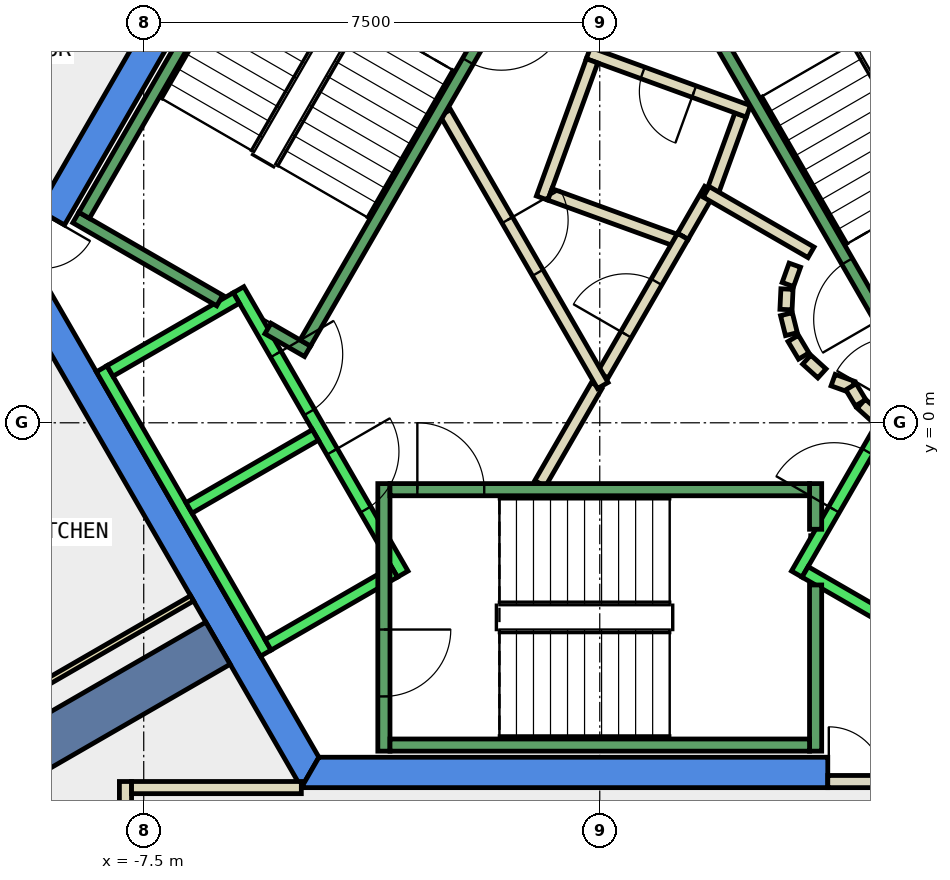
"""IFC4 building model, lengths in metres.
Left out: names, types, materials, properties, quantities, classifications, styles, units other than length and angle.
Written with IfcOpenShell. Run it as: python <this file> out.ifc"""

import sys

from ifc_helpers import new_model, si_unit, direction, frame, frame_2d, origin, place, context, subcontext, project, spatial, polyline, rectangle, outline, extrude, element, fill, save


model = new_model("IFC4")
c1 = context("Model", 3, precision=1e-05, world=origin(), true_north=direction((0.0, 1.0)))
c2 = subcontext(c1, "Body", "Model", "MODEL_VIEW")
j1 = project(units=[si_unit("LENGTHUNIT", "METRE"), si_unit("PLANEANGLEUNIT", "RADIAN")], contexts=[c1])
p1 = place(None, origin())
s1 = spatial("IfcSite", under=j1, at=p1, CompositionType="ELEMENT")
p2 = place(p1, origin())
s2 = spatial("IfcBuilding", under=s1, at=p2, CompositionType="ELEMENT")
p3 = place(p2, frame((0.0, 0.0, 322.4)))
s3 = spatial("IfcBuildingStorey", under=s2, at=p3, CompositionType="ELEMENT", Elevation=322.4)
p4 = place(p3, frame((0.0, 0.0, -0.34)))
e1 = element("IfcWall", 1, at=p4, inside=s3, PredefinedType="SHEAR", context=c2, shape_type="SweptSolid", body=[
    extrude(outline(polyline([(-9.236, 3.502), (-8.803, 3.253), (-4.619, 10.5), (-4.907, 11.0), (-9.236, 3.502)])), origin(), (0.0, 0.0, 1.0), 3.34),
])
p5 = place(p3, frame((0.0, 0.0, -0.34)))
e2 = element("IfcWall", 2, at=p5, inside=s3, PredefinedType="SHEAR", context=c2, shape_type="SweptSolid", body=[
    extrude(outline(polyline([(-9.815, 2.5), (-4.907, -6.0), (-4.619, -5.5), (-9.238, 2.5), (-9.815, 2.5)])), origin(), (0.0, 0.0, 1.0), 3.34),
])
p6 = place(p3, frame((0.0, 0.0, -0.34)))
e3 = element("IfcWall", 3, at=p6, inside=s3, PredefinedType="SHEAR", context=c2, shape_type="SweptSolid", body=[
    extrude(outline(polyline([(3.75, -6.0), (3.75, -5.5), (-4.619, -5.5), (-4.907, -6.0), (3.75, -6.0)])), origin(), (0.0, 0.0, 1.0), 3.34),
])
p7 = place(p3, frame((-6.279, -3.625, -0.34), z_axis=(0.0, 0.0, 1.0), x_axis=(-0.866017533419, -0.500013631625, 0.0)))
e4 = element("IfcWall", 4, at=p7, inside=s3, PredefinedType="SHEAR", context=c2, shape_type="SweptSolid", body=[
    extrude(rectangle(XDim=9.0, YDim=0.8, at=frame_2d((4.5, 0.0))), origin(), (0.0, 0.0, 1.0), 3.34),
])
p8 = place(p3, frame((1.366, 3.066, 0.0), z_axis=(0.0, 0.0, 1.0), x_axis=(0.499698775601, 0.866199245938, 0.0)))
e5 = element("IfcWall", 5, at=p8, inside=s3, PredefinedType="PARTITIONING", context=c2, shape_type="SweptSolid", body=[
    extrude(rectangle(XDim=0.893, YDim=0.2, at=frame_2d((0.446, 0.0))), origin(), (0.0, 0.0, 1.0), 3.0),
])
p9 = place(p3, frame((1.838, 3.748, 0.0), z_axis=(0.0, 0.0, 1.0), x_axis=(0.341883255813, 0.939742432475, 0.0)))
e6 = element("IfcWall", 6, at=p9, inside=s3, PredefinedType="PARTITIONING", context=c2, shape_type="SweptSolid", body=[
    extrude(rectangle(XDim=1.398, YDim=0.2, at=frame_2d((0.699, 0.0))), origin(), (0.0, 0.0, 1.0), 3.0),
])
p10 = place(p3, frame((2.444, 5.122, 0.0), z_axis=(0.0, 0.0, 1.0), x_axis=(-0.939650782256, 0.342135071873, 0.0)))
e7 = element("IfcWall", 7, at=p10, inside=s3, PredefinedType="PARTITIONING", context=c2, shape_type="SweptSolid", body=[
    extrude(rectangle(XDim=2.8, YDim=0.2, at=frame_2d((1.4, 0.0))), origin(), (0.0, 0.0, 1.0), 3.0),
])
p11 = place(p10, frame((0.95, 0.0, 0.0)))
e8 = element("IfcOpeningElement", 8, at=p11, cuts=e7, PredefinedType="OPENING", context=c2, shape_type="SweptSolid", body=[
    extrude(rectangle(XDim=0.9, YDim=2.1, at=frame_2d((0.45, 1.05))), frame((0.0, 0.11, 0.0), z_axis=(0.0, -1.0, 0.0), x_axis=(1.0, 0.0, 0.0)), (0.0, 0.0, 1.0), 0.22),
])
p12 = place(p3, frame((-0.127, 5.952, 0.0), z_axis=(0.0, 0.0, 1.0), x_axis=(-0.342012513308, -0.93969539785, 0.0)))
e9 = element("IfcWall", 9, at=p12, inside=s3, PredefinedType="PARTITIONING", context=c2, shape_type="SweptSolid", body=[
    extrude(rectangle(XDim=2.401, YDim=0.2, at=frame_2d((1.2, 0.0))), origin(), (0.0, 0.0, 1.0), 3.0),
])
p13 = place(p3, frame((-0.82, 3.756, 0.0), z_axis=(0.0, 0.0, 1.0), x_axis=(0.939740098492, -0.34188967122, 0.0)))
e10 = element("IfcWall", 10, at=p13, inside=s3, PredefinedType="PARTITIONING", context=c2, shape_type="SweptSolid", body=[
    extrude(rectangle(XDim=2.273, YDim=0.2, at=frame_2d((1.136, 0.0))), origin(), (0.0, 0.0, 1.0), 3.0),
])
p14 = place(p3, frame((-0.982, -1.0, 0.0), z_axis=(0.0, 0.0, 1.0), x_axis=(0.50024047865, 0.865886518847, 0.0)))
e11 = element("IfcWall", 11, at=p14, inside=s3, PredefinedType="PARTITIONING", context=c2, shape_type="SweptSolid", body=[
    extrude(rectangle(XDim=1.863, YDim=0.2, at=frame_2d((0.931, 0.0))), origin(), (0.0, 0.0, 1.0), 3.0),
])
p15 = place(p3, frame((0.05, 0.787, 0.0), z_axis=(0.0, 0.0, 1.0), x_axis=(0.500070457302, 0.865984721421, 0.0)))
e12 = element("IfcWall", 12, at=p15, inside=s3, PredefinedType="PARTITIONING", context=c2, shape_type="SweptSolid", body=[
    extrude(rectangle(XDim=2.631, YDim=0.2, at=frame_2d((1.316, 0.0))), origin(), (0.0, 0.0, 1.0), 3.0),
])
p16 = place(p15, frame((0.766, 0.0, 0.0)))
e13 = element("IfcOpeningElement", 13, at=p16, cuts=e12, PredefinedType="OPENING", context=c2, shape_type="SweptSolid", body=[
    extrude(rectangle(XDim=1.0, YDim=2.1, at=frame_2d((0.5, 1.05))), frame((0.0, 0.11, 0.0), z_axis=(0.0, -1.0, 0.0), x_axis=(1.0, 0.0, 0.0)), (0.0, 0.0, 1.0), 0.22),
])
p17 = place(p3, frame((1.751, 3.798, 0.0), z_axis=(0.0, 0.0, 1.0), x_axis=(0.866091650241, -0.499885240213, 0.0)))
e14 = element("IfcWall", 14, at=p17, inside=s3, PredefinedType="PARTITIONING", context=c2, shape_type="SweptSolid", body=[
    extrude(rectangle(XDim=1.991, YDim=0.2, at=frame_2d((0.995, 0.0))), origin(), (0.0, 0.0, 1.0), 3.0),
])
p18 = place(p3, frame((3.208, 2.592, 0.0), z_axis=(0.0, 0.0, 1.0), x_axis=(-0.337388820924, -0.941365382578, 0.0)))
e15 = element("IfcWall", 15, at=p18, inside=s3, PredefinedType="PARTITIONING", context=c2, shape_type="SweptSolid", body=[
    extrude(rectangle(XDim=0.338, YDim=0.2, at=frame_2d((0.169, 0.0))), origin(), (0.0, 0.0, 1.0), 3.0),
])
p19 = place(p3, frame((3.079, 2.199, 0.0), z_axis=(0.0, 0.0, 1.0), x_axis=(-0.047771483479, -0.998858290933, 0.0)))
e16 = element("IfcWall", 16, at=p19, inside=s3, PredefinedType="PARTITIONING", context=c2, shape_type="SweptSolid", body=[
    extrude(rectangle(XDim=0.337, YDim=0.2, at=frame_2d((0.169, 0.0))), origin(), (0.0, 0.0, 1.0), 3.0),
])
p20 = place(p3, frame((3.07, 1.786, 0.0), z_axis=(0.0, 0.0, 1.0), x_axis=(0.242705583207, -0.970099994784, 0.0)))
e17 = element("IfcWall", 17, at=p20, inside=s3, PredefinedType="PARTITIONING", context=c2, shape_type="SweptSolid", body=[
    extrude(rectangle(XDim=0.338, YDim=0.2, at=frame_2d((0.169, 0.0))), origin(), (0.0, 0.0, 1.0), 3.0),
])
for number, where, z_axis, x_axis in (
    (18, (3.182, 1.388, 0.0), (0.0, 0.0, 1.0), (0.512, -0.859, 0.0)),
    (19, (3.404, 1.039, 0.0), (0.0, 0.0, 1.0), (0.74, -0.672, 0.0)),
):
    element("IfcWall", number, at=place(p3, frame(where, z_axis=z_axis, x_axis=x_axis)), inside=s3, PredefinedType="PARTITIONING", context=c2, shape_type="SweptSolid", body=[
        extrude(rectangle(XDim=0.338, YDim=0.2, at=frame_2d((0.169, 0.0))), origin(), (0.0, 0.0, 1.0), 3.0),
    ])
p21 = place(p3, frame((3.838, 0.702, 0.0), z_axis=(0.0, 0.0, 1.0), x_axis=(0.941035081519, -0.338308993895, 0.0)))
e20 = element("IfcWall", 20, at=p21, inside=s3, PredefinedType="PARTITIONING", context=c2, shape_type="SweptSolid", body=[
    extrude(rectangle(XDim=0.337, YDim=0.2, at=frame_2d((0.168, 0.0))), origin(), (0.0, 0.0, 1.0), 3.0),
])
p22 = place(p3, frame((4.132, 0.593, 0.0), z_axis=(0.0, 0.0, 1.0), x_axis=(0.513561617048, -0.858052717201, 0.0)))
e21 = element("IfcWall", 21, at=p22, inside=s3, PredefinedType="PARTITIONING", context=c2, shape_type="SweptSolid", body=[
    extrude(rectangle(XDim=0.308, YDim=0.2, at=frame_2d((0.154, 0.0))), origin(), (0.0, 0.0, 1.0), 3.0),
])
p23 = place(p3, frame((4.301, 0.315, 0.0), z_axis=(0.0, 0.0, 1.0), x_axis=(0.741798017506, -0.670623367639, 0.0)))
e22 = element("IfcWall", 22, at=p23, inside=s3, PredefinedType="PARTITIONING", context=c2, shape_type="SweptSolid", body=[
    extrude(rectangle(XDim=0.309, YDim=0.2, at=frame_2d((0.154, 0.0))), origin(), (0.0, 0.0, 1.0), 3.0),
])
p24 = place(p3, frame((-2.54, 5.1, 0.0), z_axis=(0.0, 0.0, 1.0), x_axis=(0.499925051871, -0.866068670783, 0.0)))
e23 = element("IfcWall", 23, at=p24, inside=s3, PredefinedType="PARTITIONING", context=c2, shape_type="SweptSolid", body=[
    extrude(rectangle(XDim=5.181, YDim=0.2, at=frame_2d((2.59, 0.0))), origin(), (0.0, 0.0, 1.0), 3.0),
])
p25 = place(p24, frame((2.04, 0.0, 0.0)))
e24 = element("IfcOpeningElement", 24, at=p25, cuts=e23, PredefinedType="OPENING", context=c2, shape_type="SweptSolid", body=[
    extrude(rectangle(XDim=1.0, YDim=2.1, at=frame_2d((0.5, 1.05))), frame((0.0, 0.11, 0.0), z_axis=(0.0, -1.0, 0.0), x_axis=(1.0, 0.0, 0.0)), (0.0, 0.0, 1.0), 0.22),
])
p26 = place(p3, frame((-7.8, -11.624, 0.0), z_axis=(0.0, 0.0, 1.0), x_axis=(0.0, 1.0, 0.0)))
e25 = element("IfcWall", 25, at=p26, inside=s3, PredefinedType="PARTITIONING", context=c2, shape_type="SweptSolid", body=[
    extrude(rectangle(XDim=5.725, YDim=0.2, at=frame_2d((2.863, 0.0))), origin(), (0.0, 0.0, 1.0), 3.0),
])
p27 = place(p3, frame((-7.7, -5.999, 0.0), z_axis=(0.0, 0.0, 1.0), x_axis=(1.0, 0.0, 0.0)))
e26 = element("IfcWall", 26, at=p27, inside=s3, PredefinedType="PARTITIONING", context=c2, shape_type="SweptSolid", body=[
    extrude(rectangle(XDim=2.792, YDim=0.2, at=frame_2d((1.396, 0.0))), origin(), (0.0, 0.0, 1.0), 3.0),
])
p28 = place(p3, frame((-6.705, -2.887, 0.0), z_axis=(0.0, 0.0, 1.0), x_axis=(-0.866001397039, -0.500041578597, 0.0)))
e27 = element("IfcWall", 27, at=p28, inside=s3, PredefinedType="PARTITIONING", context=c2, shape_type="SweptSolid", body=[
    extrude(rectangle(XDim=6.998, YDim=0.1, at=frame_2d((3.499, 0.0))), origin(), (0.0, 0.0, 1.0), 3.0),
])
p29 = place(p3, frame((3.75, -5.9, 0.0), z_axis=(0.0, 0.0, 1.0), x_axis=(1.0, 0.0, 0.0)))
e28 = element("IfcWall", 28, at=p29, inside=s3, PredefinedType="PARTITIONING", context=c2, shape_type="SweptSolid", body=[
    extrude(rectangle(XDim=0.926, YDim=0.2, at=frame_2d((0.463, 0.0))), origin(), (0.0, 0.0, 1.0), 2.4),
])
p30 = place(p29, frame((0.017, 0.0, 0.0)))
e29 = element("IfcOpeningElement", 29, at=p30, cuts=e28, PredefinedType="OPENING", context=c2, shape_type="SweptSolid", body=[
    extrude(rectangle(XDim=0.9, YDim=2.1, at=frame_2d((0.45, 1.05))), frame((0.0, 0.11, 0.0), z_axis=(0.0, -1.0, 0.0), x_axis=(1.0, 0.0, 0.0)), (0.0, 0.0, 1.0), 0.22),
])
p31 = place(p3, frame((-5.94, 2.188, 0.0), z_axis=(0.0, 0.0, 1.0), x_axis=(0.500034260056, -0.866005622828, 0.0)))
e30 = element("IfcWall", 30, at=p31, inside=s3, PredefinedType="STANDARD", context=c2, shape_type="SweptSolid", body=[
    extrude(rectangle(XDim=5.399, YDim=0.2, at=frame_2d((2.7, 0.0))), origin(), (0.0, 0.0, 1.0), 3.0),
])
p32 = place(p31, frame((3.075, 0.0, 0.0)))
e31 = element("IfcOpeningElement", 31, at=p32, cuts=e30, PredefinedType="OPENING", context=c2, shape_type="SweptSolid", body=[
    extrude(rectangle(XDim=1.1, YDim=2.1, at=frame_2d((0.55, 1.05))), frame((0.0, 0.11, 0.0), z_axis=(0.0, -1.0, 0.0), x_axis=(1.0, 0.0, 0.0)), (0.0, 0.0, 1.0), 0.22),
])
p33 = place(p31, frame((1.225, 0.0, 0.0)))
e32 = element("IfcOpeningElement", 32, at=p33, cuts=e30, PredefinedType="OPENING", context=c2, shape_type="SweptSolid", body=[
    extrude(rectangle(XDim=1.1, YDim=2.1, at=frame_2d((0.55, 1.05))), frame((0.0, 0.11, 0.0), z_axis=(0.0, -1.0, 0.0), x_axis=(1.0, 0.0, 0.0)), (0.0, 0.0, 1.0), 0.22),
])
p34 = place(p3, frame((-8.192, 0.888, 0.0), z_axis=(0.0, 0.0, 1.0), x_axis=(0.500034260056, -0.866005622828, 0.0)))
e33 = element("IfcWall", 33, at=p34, inside=s3, PredefinedType="STANDARD", context=c2, shape_type="SweptSolid", body=[
    extrude(rectangle(XDim=5.399, YDim=0.2, at=frame_2d((2.7, 0.0))), origin(), (0.0, 0.0, 1.0), 3.0),
])
for number, where, z_axis, x_axis in (
    (34, (-5.977, 2.052, 0.0), (0.0, 0.0, 1.0), (-0.866, -0.5, 0.0)),
    (35, (-4.677, -0.2, 0.0), (0.0, 0.0, 1.0), (-0.866, -0.5, 0.0)),
):
    element("IfcWall", number, at=place(p3, frame(where, z_axis=z_axis, x_axis=x_axis)), inside=s3, PredefinedType="STANDARD", context=c2, shape_type="SweptSolid", body=[
        extrude(rectangle(XDim=2.399, YDim=0.2, at=frame_2d((1.2, 0.0))), origin(), (0.0, 0.0, 1.0), 3.0),
    ])
p35 = place(p3, frame((-3.377, -2.452, 0.0), z_axis=(0.0, 0.0, 1.0), x_axis=(-0.865955154139, -0.50012165622, 0.0)))
e36 = element("IfcWall", 36, at=p35, inside=s3, PredefinedType="STANDARD", context=c2, shape_type="SweptSolid", body=[
    extrude(rectangle(XDim=2.4, YDim=0.2, at=frame_2d((1.2, 0.0))), origin(), (0.0, 0.0, 1.0), 3.0),
])
p36 = place(p3, frame((3.24, -2.488, 0.0), z_axis=(0.0, 0.0, 1.0), x_axis=(0.500034260056, 0.866005622828, 0.0)))
e37 = element("IfcWall", 37, at=p36, inside=s3, PredefinedType="STANDARD", context=c2, shape_type="SweptSolid", body=[
    extrude(rectangle(XDim=5.399, YDim=0.2, at=frame_2d((2.7, 0.0))), origin(), (0.0, 0.0, 1.0), 3.0),
])
p37 = place(p36, frame((3.225, 0.0, 0.0)))
e38 = element("IfcOpeningElement", 38, at=p37, cuts=e37, PredefinedType="OPENING", context=c2, shape_type="SweptSolid", body=[
    extrude(rectangle(XDim=1.1, YDim=2.1, at=frame_2d((0.55, 1.05))), frame((0.0, 0.11, 0.0), z_axis=(0.0, -1.0, 0.0), x_axis=(1.0, 0.0, 0.0)), (0.0, 0.0, 1.0), 0.22),
])
p38 = place(p36, frame((1.225, 0.0, 0.0)))
e39 = element("IfcOpeningElement", 39, at=p38, cuts=e37, PredefinedType="OPENING", context=c2, shape_type="SweptSolid", body=[
    extrude(rectangle(XDim=1.1, YDim=2.1, at=frame_2d((0.55, 1.05))), frame((0.0, 0.11, 0.0), z_axis=(0.0, -1.0, 0.0), x_axis=(1.0, 0.0, 0.0)), (0.0, 0.0, 1.0), 0.22),
])
p39 = place(p3, frame((3.377, -2.452, 0.0), z_axis=(0.0, 0.0, 1.0), x_axis=(0.865955154139, -0.50012165622, 0.0)))
e40 = element("IfcWall", 40, at=p39, inside=s3, PredefinedType="STANDARD", context=c2, shape_type="SweptSolid", body=[
    extrude(rectangle(XDim=2.4, YDim=0.2, at=frame_2d((1.2, 0.0))), origin(), (0.0, 0.0, 1.0), 3.0),
])
p40 = place(p3, frame((-3.55, -1.0, 0.0), z_axis=(0.0, 0.0, 1.0), x_axis=(0.0, -1.0, 0.0)))
e41 = element("IfcWall", 41, at=p40, inside=s3, PredefinedType="STANDARD", context=c2, shape_type="SweptSolid", body=[
    extrude(rectangle(XDim=4.4, YDim=0.2, at=frame_2d((2.2, 0.0))), origin(), (0.0, 0.0, 1.0), 3.0),
])
p41 = place(p40, frame((2.4, 0.0, 0.0)))
e42 = element("IfcOpeningElement", 42, at=p41, cuts=e41, PredefinedType="OPENING", context=c2, shape_type="SweptSolid", body=[
    extrude(rectangle(XDim=1.1, YDim=2.2, at=frame_2d((0.55, 1.1))), frame((0.0, 0.11, 0.0), z_axis=(0.0, -1.0, 0.0), x_axis=(1.0, 0.0, 0.0)), (0.0, 0.0, 1.0), 0.22),
])
p42 = place(p3, frame((3.55, -2.667, 0.0), z_axis=(0.0, 0.0, 1.0), x_axis=(0.0, -1.0, 0.0)))
e43 = element("IfcWall", 43, at=p42, inside=s3, PredefinedType="STANDARD", context=c2, shape_type="SweptSolid", body=[
    extrude(rectangle(XDim=2.733, YDim=0.2, at=frame_2d((1.366, 0.0))), origin(), (0.0, 0.0, 1.0), 3.0),
])
p43 = place(p3, frame((3.55, -1.0, 0.0), z_axis=(0.0, 0.0, 1.0), x_axis=(0.0, -1.0, 0.0)))
e44 = element("IfcWall", 44, at=p43, inside=s3, PredefinedType="STANDARD", context=c2, shape_type="SweptSolid", body=[
    extrude(rectangle(XDim=0.751, YDim=0.2, at=frame_2d((0.375, 0.0))), origin(), (0.0, 0.0, 1.0), 3.0),
])
p44 = place(p3, frame((-3.45, -1.1, 0.0), z_axis=(0.0, 0.0, 1.0), x_axis=(1.0, 0.0, 0.0)))
e45 = element("IfcWall", 45, at=p44, inside=s3, PredefinedType="STANDARD", context=c2, shape_type="SweptSolid", body=[
    extrude(rectangle(XDim=6.9, YDim=0.2, at=frame_2d((3.45, 0.0))), origin(), (0.0, 0.0, 1.0), 3.0),
])
p45 = place(p44, frame((0.45, 0.0, 0.0)))
e46 = element("IfcOpeningElement", 46, at=p45, cuts=e45, PredefinedType="OPENING", context=c2, shape_type="SweptSolid", body=[
    extrude(rectangle(XDim=1.1, YDim=2.2, at=frame_2d((0.55, 1.1))), frame((0.0, 0.11, 0.0), z_axis=(0.0, -1.0, 0.0), x_axis=(1.0, 0.0, 0.0)), (0.0, 0.0, 1.0), 0.22),
])
p46 = place(p3, frame((-3.45, -5.3, 0.0), z_axis=(0.0, 0.0, 1.0), x_axis=(1.0, 0.0, 0.0)))
e47 = element("IfcWall", 47, at=p46, inside=s3, PredefinedType="STANDARD", context=c2, shape_type="SweptSolid", body=[
    extrude(rectangle(XDim=6.9, YDim=0.2, at=frame_2d((3.45, 0.0))), origin(), (0.0, 0.0, 1.0), 3.0),
])
p47 = place(p3, frame((4.843, 1.312, 0.0), z_axis=(0.0, 0.0, 1.0), x_axis=(-0.499963383562, 0.866046543262, 0.0)))
e48 = element("IfcWall", 48, at=p47, inside=s3, PredefinedType="STANDARD", context=c2, shape_type="SweptSolid", body=[
    extrude(rectangle(XDim=6.9, YDim=0.2, at=frame_2d((3.45, 0.0))), origin(), (0.0, 0.0, 1.0), 3.0),
])
p48 = place(p47, frame((0.45, 0.0, 0.0)))
e49 = element("IfcOpeningElement", 49, at=p48, cuts=e48, PredefinedType="OPENING", context=c2, shape_type="SweptSolid", body=[
    extrude(rectangle(XDim=1.1, YDim=2.2, at=frame_2d((0.55, 1.1))), frame((0.0, 0.11, 0.0), z_axis=(0.0, -1.0, 0.0), x_axis=(1.0, 0.0, 0.0)), (0.0, 0.0, 1.0), 0.22),
])
p49 = place(p3, frame((-6.25, 2.01, 0.0), z_axis=(0.0, 0.0, 1.0), x_axis=(-0.86611865017, 0.499838457731, 0.0)))
e50 = element("IfcWall", 50, at=p49, inside=s3, PredefinedType="STANDARD", context=c2, shape_type="SweptSolid", body=[
    extrude(rectangle(XDim=2.733, YDim=0.2, at=frame_2d((1.366, 0.0))), origin(), (0.0, 0.0, 1.0), 3.0),
])
p50 = place(p3, frame((-4.806, 1.176, 0.0), z_axis=(0.0, 0.0, 1.0), x_axis=(-0.866558586415, 0.499075361355, 0.0)))
e51 = element("IfcWall", 51, at=p50, inside=s3, PredefinedType="STANDARD", context=c2, shape_type="SweptSolid", body=[
    extrude(rectangle(XDim=0.751, YDim=0.2, at=frame_2d((0.376, 0.0))), origin(), (0.0, 0.0, 1.0), 3.0),
])
p51 = place(p3, frame((-1.393, 7.288, 0.0), z_axis=(0.0, 0.0, 1.0), x_axis=(-0.499963383562, -0.866046543262, 0.0)))
e52 = element("IfcWall", 52, at=p51, inside=s3, PredefinedType="STANDARD", context=c2, shape_type="SweptSolid", body=[
    extrude(rectangle(XDim=6.9, YDim=0.2, at=frame_2d((3.45, 0.0))), origin(), (0.0, 0.0, 1.0), 3.0),
])
p52 = place(p51, frame((0.45, 0.0, 0.0)))
e53 = element("IfcOpeningElement", 53, at=p52, cuts=e52, PredefinedType="OPENING", context=c2, shape_type="SweptSolid", body=[
    extrude(rectangle(XDim=1.1, YDim=2.2, at=frame_2d((0.55, 1.1))), frame((0.0, 0.11, 0.0), z_axis=(0.0, -1.0, 0.0), x_axis=(1.0, 0.0, 0.0)), (0.0, 0.0, 1.0), 0.22),
])
p53 = place(p3, frame((-5.03, 9.388, 0.0), z_axis=(0.0, 0.0, 1.0), x_axis=(-0.499978703459, -0.866037698999, 0.0)))
e54 = element("IfcWall", 54, at=p53, inside=s3, PredefinedType="STANDARD", context=c2, shape_type="SweptSolid", body=[
    extrude(rectangle(XDim=6.9, YDim=0.2, at=frame_2d((3.45, 0.0))), origin(), (0.0, 0.0, 1.0), 3.0),
])
p54 = place(p16, origin())
e55 = element("IfcDoor", 55, at=p54, inside=s3, OperationType="SINGLE_SWING_RIGHT", PredefinedType="DOOR", context=c2, shape_type="SweptSolid", body=[
    extrude(rectangle(XDim=1.0, YDim=2.1, at=frame_2d((0.5, 1.05))), frame((0.0, 0.025, 0.0), z_axis=(0.0, -1.0, 0.0), x_axis=(1.0, 0.0, 0.0)), (0.0, 0.0, 1.0), 0.05),
])
fill(e13, e55)
p55 = place(p25, origin())
e56 = element("IfcDoor", 56, at=p55, inside=s3, OperationType="SINGLE_SWING_RIGHT", PredefinedType="DOOR", context=c2, shape_type="SweptSolid", body=[
    extrude(rectangle(XDim=1.0, YDim=2.1, at=frame_2d((0.5, 1.05))), frame((0.0, 0.025, 0.0), z_axis=(0.0, -1.0, 0.0), x_axis=(1.0, 0.0, 0.0)), (0.0, 0.0, 1.0), 0.05),
])
fill(e24, e56)
p56 = place(p11, origin())
e57 = element("IfcDoor", 57, at=p56, inside=s3, OperationType="SINGLE_SWING_LEFT", PredefinedType="DOOR", context=c2, shape_type="SweptSolid", body=[
    extrude(rectangle(XDim=0.9, YDim=2.1, at=frame_2d((0.45, 1.05))), frame((0.0, 0.025, 0.0), z_axis=(0.0, -1.0, 0.0), x_axis=(1.0, 0.0, 0.0)), (0.0, 0.0, 1.0), 0.05),
])
fill(e8, e57)
p57 = place(p30, origin())
e58 = element("IfcDoor", 58, at=p57, inside=s3, OperationType="SINGLE_SWING_LEFT", PredefinedType="DOOR", context=c2, shape_type="SweptSolid", body=[
    extrude(rectangle(XDim=0.9, YDim=2.1, at=frame_2d((0.45, 1.05))), frame((0.0, 0.025, 0.0), z_axis=(0.0, -1.0, 0.0), x_axis=(1.0, 0.0, 0.0)), (0.0, 0.0, 1.0), 0.05),
])
fill(e29, e58)
p58 = place(p32, origin())
e59 = element("IfcDoor", 59, at=p58, inside=s3, OperationType="SLIDING_TO_LEFT", PredefinedType="DOOR", context=c2, shape_type="SweptSolid", body=[
    extrude(rectangle(XDim=1.1, YDim=2.1, at=frame_2d((0.55, 1.05))), frame((0.0, 0.025, 0.0), z_axis=(0.0, -1.0, 0.0), x_axis=(1.0, 0.0, 0.0)), (0.0, 0.0, 1.0), 0.05),
])
fill(e31, e59)
p59 = place(p38, origin())
e60 = element("IfcDoor", 60, at=p59, inside=s3, OperationType="SLIDING_TO_LEFT", PredefinedType="DOOR", context=c2, shape_type="SweptSolid", body=[
    extrude(rectangle(XDim=1.1, YDim=2.1, at=frame_2d((0.55, 1.05))), frame((0.0, 0.025, 0.0), z_axis=(0.0, -1.0, 0.0), x_axis=(1.0, 0.0, 0.0)), (0.0, 0.0, 1.0), 0.05),
])
fill(e39, e60)
p60 = place(p33, origin())
e61 = element("IfcDoor", 61, at=p60, inside=s3, OperationType="SLIDING_TO_LEFT", PredefinedType="DOOR", context=c2, shape_type="SweptSolid", body=[
    extrude(rectangle(XDim=1.1, YDim=2.1, at=frame_2d((0.55, 1.05))), frame((0.0, 0.025, 0.0), z_axis=(0.0, -1.0, 0.0), x_axis=(1.0, 0.0, 0.0)), (0.0, 0.0, 1.0), 0.05),
])
fill(e32, e61)
p61 = place(p45, origin())
e62 = element("IfcDoor", 62, at=p61, inside=s3, OperationType="SINGLE_SWING_LEFT", PredefinedType="DOOR", context=c2, shape_type="SweptSolid", body=[
    extrude(rectangle(XDim=1.1, YDim=2.2, at=frame_2d((0.55, 1.1))), frame((0.0, 0.025, 0.0), z_axis=(0.0, -1.0, 0.0), x_axis=(1.0, 0.0, 0.0)), (0.0, 0.0, 1.0), 0.05),
])
fill(e46, e62)
p62 = place(p41, origin())
e63 = element("IfcDoor", 63, at=p62, inside=s3, OperationType="SINGLE_SWING_LEFT", PredefinedType="DOOR", context=c2, shape_type="SweptSolid", body=[
    extrude(rectangle(XDim=1.1, YDim=2.2, at=frame_2d((0.55, 1.1))), frame((0.0, 0.025, 0.0), z_axis=(0.0, -1.0, 0.0), x_axis=(1.0, 0.0, 0.0)), (0.0, 0.0, 1.0), 0.05),
])
fill(e42, e63)
p63 = place(p48, origin())
e64 = element("IfcDoor", 64, at=p63, inside=s3, OperationType="SINGLE_SWING_LEFT", PredefinedType="DOOR", context=c2, shape_type="SweptSolid", body=[
    extrude(rectangle(XDim=1.1, YDim=2.2, at=frame_2d((0.55, 1.1))), frame((0.0, 0.025, 0.0), z_axis=(0.0, -1.0, 0.0), x_axis=(1.0, 0.0, 0.0)), (0.0, 0.0, 1.0), 0.05),
])
fill(e49, e64)
p64 = place(p52, origin())
e65 = element("IfcDoor", 65, at=p64, inside=s3, OperationType="SINGLE_SWING_LEFT", PredefinedType="DOOR", context=c2, shape_type="SweptSolid", body=[
    extrude(rectangle(XDim=1.1, YDim=2.2, at=frame_2d((0.55, 1.1))), frame((0.0, 0.025, 0.0), z_axis=(0.0, -1.0, 0.0), x_axis=(1.0, 0.0, 0.0)), (0.0, 0.0, 1.0), 0.05),
])
fill(e53, e65)
save(model, sys.argv[1])
